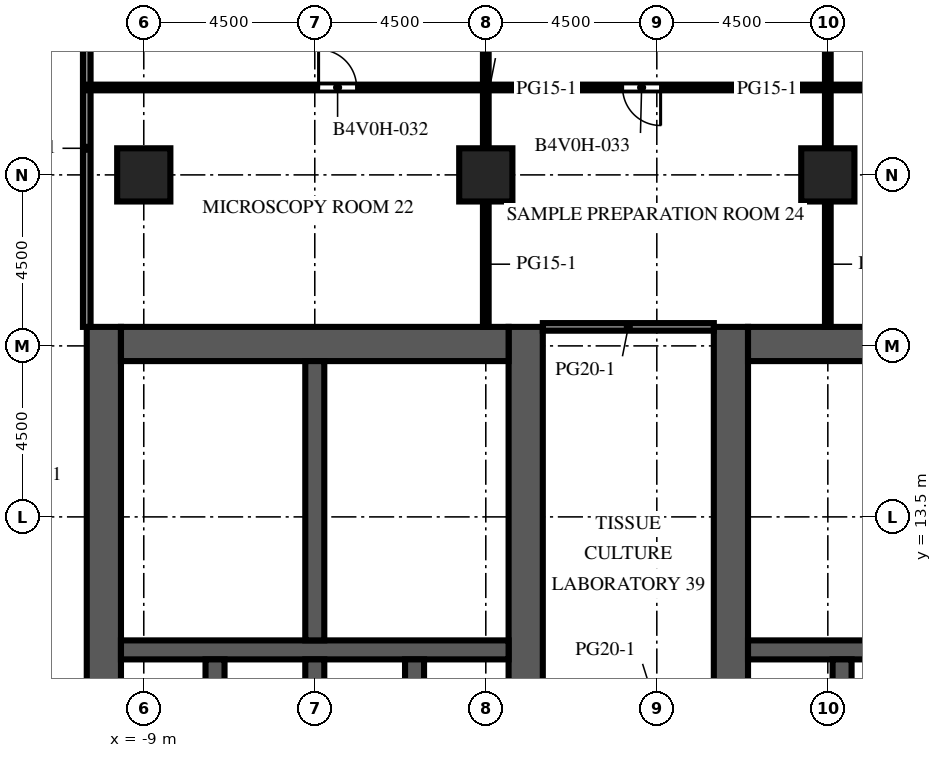
"""IFC4 building model, lengths in metres.
Left out: names, types, materials, properties, quantities, classifications, styles, units other than length and angle.
Written with IfcOpenShell. Run it as: python <this file> out.ifc"""

import sys

from ifc_helpers import new_model, si_unit, direction, frame, frame_2d, origin, origin_2d, place, context, subcontext, project, spatial, rectangle, extrude, element, fill, save


model = new_model("IFC4")
c1 = context("Model", 3, precision=1e-05, world=origin(), true_north=direction((0.0, 1.0)))
c2 = subcontext(c1, "Body", "Model", "MODEL_VIEW")
j1 = project(units=[si_unit("LENGTHUNIT", "METRE"), si_unit("PLANEANGLEUNIT", "RADIAN")], contexts=[c1])
p1 = place(None, origin())
s1 = spatial("IfcSite", under=j1, at=p1, CompositionType="ELEMENT")
p2 = place(p1, origin())
s2 = spatial("IfcBuilding", under=s1, at=p2, CompositionType="ELEMENT")
p3 = place(p2, frame((0.0, 0.0, 116.7)))
s3 = spatial("IfcBuildingStorey", under=s2, at=p3, CompositionType="ELEMENT", Elevation=116.7)
for number, where, z_axis, x_axis in (
    (1, (-9.0, 22.5, 0.0), (0.0, 0.0, 1.0), (1.0, 0.0, 0.0)),
    (2, (0.0, 22.5, 0.0), (0.0, 0.0, 1.0), (1.0, 0.0, 0.0)),
    (3, (9.0, 22.5, 0.0), (0.0, 0.0, 1.0), (1.0, 0.0, 0.0)),
):
    element("IfcColumn", number, at=place(p3, frame(where, z_axis=z_axis, x_axis=x_axis)), inside=s3, PredefinedType="COLUMN", context=c2, shape_type="SweptSolid", body=[
        extrude(rectangle(XDim=1.4, YDim=1.4, at=origin_2d()), origin(), (0.0, 0.0, 1.0), 4.1),
    ])
p4 = place(p3, frame((-10.05, -9.0, 0.0), z_axis=(0.0, 0.0, 1.0), x_axis=(0.0, 1.0, 0.0)))
e4 = element("IfcWall", 4, at=p4, inside=s3, PredefinedType="SHEAR", context=c2, shape_type="SweptSolid", body=[
    extrude(rectangle(XDim=27.5, YDim=0.9, at=frame_2d((13.75, 0.0))), origin(), (0.0, 0.0, 1.0), 4.1),
])
p5 = place(p4, frame((12.55, 0.0, 0.0)))
e5 = element("IfcOpeningElement", 5, at=p5, cuts=e4, PredefinedType="OPENING", context=c2, shape_type="SweptSolid", body=[
    extrude(rectangle(XDim=2.4, YDim=2.4, at=frame_2d((1.2, 1.2))), frame((0.0, 0.46, 0.0), z_axis=(0.0, -1.0, 0.0), x_axis=(1.0, 0.0, 0.0)), (0.0, 0.0, 1.0), 0.92),
])
p6 = place(p4, frame((6.825, 0.0, 0.0)))
e6 = element("IfcOpeningElement", 6, at=p6, cuts=e4, PredefinedType="OPENING", context=c2, shape_type="SweptSolid", body=[
    extrude(rectangle(XDim=1.2, YDim=2.1, at=frame_2d((0.6, 1.05))), frame((0.0, 0.46, 0.0), z_axis=(0.0, -1.0, 0.0), x_axis=(1.0, 0.0, 0.0)), (0.0, 0.0, 1.0), 0.92),
])
p7 = place(p4, frame((19.475, 0.0, 0.0)))
e7 = element("IfcOpeningElement", 7, at=p7, cuts=e4, PredefinedType="OPENING", context=c2, shape_type="SweptSolid", body=[
    extrude(rectangle(XDim=1.2, YDim=2.1, at=frame_2d((0.6, 1.05))), frame((0.0, 0.46, 0.0), z_axis=(0.0, -1.0, 0.0), x_axis=(1.0, 0.0, 0.0)), (0.0, 0.0, 1.0), 0.92),
])
p8 = place(p3, frame((1.05, -9.0, 0.0), z_axis=(0.0, 0.0, 1.0), x_axis=(0.0, 1.0, 0.0)))
e8 = element("IfcWall", 8, at=p8, inside=s3, PredefinedType="SHEAR", context=c2, shape_type="SweptSolid", body=[
    extrude(rectangle(XDim=27.5, YDim=0.9, at=frame_2d((13.75, 0.0))), origin(), (0.0, 0.0, 1.0), 4.1),
])
p9 = place(p8, frame((12.55, 0.0, 0.0)))
e9 = element("IfcOpeningElement", 9, at=p9, cuts=e8, PredefinedType="OPENING", context=c2, shape_type="SweptSolid", body=[
    extrude(rectangle(XDim=2.4, YDim=2.4, at=frame_2d((1.2, 1.2))), frame((0.0, 0.46, 0.0), z_axis=(0.0, -1.0, 0.0), x_axis=(1.0, 0.0, 0.0)), (0.0, 0.0, 1.0), 0.92),
])
p10 = place(p8, frame((3.975, 0.0, 0.0)))
e10 = element("IfcOpeningElement", 10, at=p10, cuts=e8, PredefinedType="OPENING", context=c2, shape_type="SweptSolid", body=[
    extrude(rectangle(XDim=1.2, YDim=2.1, at=frame_2d((0.6, 1.05))), frame((0.0, 0.46, 0.0), z_axis=(0.0, -1.0, 0.0), x_axis=(1.0, 0.0, 0.0)), (0.0, 0.0, 1.0), 0.92),
])
p11 = place(p8, frame((19.485, 0.0, 0.0)))
e11 = element("IfcOpeningElement", 11, at=p11, cuts=e8, PredefinedType="OPENING", context=c2, shape_type="SweptSolid", body=[
    extrude(rectangle(XDim=1.0, YDim=2.1, at=frame_2d((0.5, 1.05))), frame((0.0, 0.46, 0.0), z_axis=(0.0, -1.0, 0.0), x_axis=(1.0, 0.0, 0.0)), (0.0, 0.0, 1.0), 0.92),
])
p12 = place(p8, frame((21.139, 0.0, 0.0)))
e12 = element("IfcOpeningElement", 12, at=p12, cuts=e8, PredefinedType="OPENING", context=c2, shape_type="SweptSolid", body=[
    extrude(rectangle(XDim=1.0, YDim=2.1, at=frame_2d((0.5, 1.05))), frame((0.0, 0.46, 0.0), z_axis=(0.0, -1.0, 0.0), x_axis=(1.0, 0.0, 0.0)), (0.0, 0.0, 1.0), 0.92),
])
p13 = place(p8, frame((23.16, 0.0, 0.0)))
e13 = element("IfcOpeningElement", 13, at=p13, cuts=e8, PredefinedType="OPENING", context=c2, shape_type="SweptSolid", body=[
    extrude(rectangle(XDim=1.0, YDim=2.1, at=frame_2d((0.5, 1.05))), frame((0.0, 0.46, 0.0), z_axis=(0.0, -1.0, 0.0), x_axis=(1.0, 0.0, 0.0)), (0.0, 0.0, 1.0), 0.92),
])
p14 = place(p8, frame((25.181, 0.0, 0.0)))
e14 = element("IfcOpeningElement", 14, at=p14, cuts=e8, PredefinedType="OPENING", context=c2, shape_type="SweptSolid", body=[
    extrude(rectangle(XDim=1.0, YDim=2.1, at=frame_2d((0.5, 1.05))), frame((0.0, 0.46, 0.0), z_axis=(0.0, -1.0, 0.0), x_axis=(1.0, 0.0, 0.0)), (0.0, 0.0, 1.0), 0.92),
])
p15 = place(p3, frame((-9.6, 18.05, 0.0), z_axis=(0.0, 0.0, 1.0), x_axis=(1.0, 0.0, 0.0)))
e15 = element("IfcWall", 15, at=p15, inside=s3, PredefinedType="SHEAR", context=c2, shape_type="SweptSolid", body=[
    extrude(rectangle(XDim=10.2, YDim=0.9, at=frame_2d((5.1, 0.0))), origin(), (0.0, 0.0, 1.0), 4.1),
])
p16 = place(p3, frame((-9.6, 10.0, 0.0), z_axis=(0.0, 0.0, 1.0), x_axis=(1.0, 0.0, 0.0)))
e16 = element("IfcWall", 16, at=p16, inside=s3, PredefinedType="SHEAR", context=c2, shape_type="SweptSolid", body=[
    extrude(rectangle(XDim=10.2, YDim=0.5, at=frame_2d((5.1, 0.0))), origin(), (0.0, 0.0, 1.0), 4.1),
])
for number, where, z_axis, x_axis in (
    (17, (-7.125, 6.95, 0.0), (0.0, 0.0, 1.0), (0.0, 1.0, 0.0)),
    (18, (-4.5, 6.95, 0.0), (0.0, 0.0, 1.0), (0.0, 1.0, 0.0)),
    (19, (-1.875, 6.95, 0.0), (0.0, 0.0, 1.0), (0.0, 1.0, 0.0)),
):
    element("IfcWall", number, at=place(p3, frame(where, z_axis=z_axis, x_axis=x_axis)), inside=s3, PredefinedType="SHEAR", context=c2, shape_type="SweptSolid", body=[
        extrude(rectangle(XDim=2.8, YDim=0.5, at=frame_2d((1.4, 0.0))), origin(), (0.0, 0.0, 1.0), 4.1),
    ])
p17 = place(p3, frame((-4.5, 10.25, 0.0), z_axis=(0.0, 0.0, 1.0), x_axis=(0.0, 1.0, 0.0)))
e20 = element("IfcWall", 20, at=p17, inside=s3, PredefinedType="SHEAR", context=c2, shape_type="SweptSolid", body=[
    extrude(rectangle(XDim=7.35, YDim=0.5, at=frame_2d((3.675, 0.0))), origin(), (0.0, 0.0, 1.0), 4.1),
])
p18 = place(p3, frame((6.45, -9.0, 0.0), z_axis=(0.0, 0.0, 1.0), x_axis=(0.0, 1.0, 0.0)))
e21 = element("IfcWall", 21, at=p18, inside=s3, PredefinedType="SHEAR", context=c2, shape_type="SweptSolid", body=[
    extrude(rectangle(XDim=27.5, YDim=0.9, at=frame_2d((13.75, 0.0))), origin(), (0.0, 0.0, 1.0), 4.1),
])
p19 = place(p18, frame((12.55, 0.0, 0.0)))
e22 = element("IfcOpeningElement", 22, at=p19, cuts=e21, PredefinedType="OPENING", context=c2, shape_type="SweptSolid", body=[
    extrude(rectangle(XDim=2.4, YDim=2.4, at=frame_2d((1.2, 1.2))), frame((0.0, 0.46, 0.0), z_axis=(0.0, -1.0, 0.0), x_axis=(1.0, 0.0, 0.0)), (0.0, 0.0, 1.0), 0.92),
])
p20 = place(p18, frame((3.975, 0.0, 0.0)))
e23 = element("IfcOpeningElement", 23, at=p20, cuts=e21, PredefinedType="OPENING", context=c2, shape_type="SweptSolid", body=[
    extrude(rectangle(XDim=1.2, YDim=2.1, at=frame_2d((0.6, 1.05))), frame((0.0, 0.46, 0.0), z_axis=(0.0, -1.0, 0.0), x_axis=(1.0, 0.0, 0.0)), (0.0, 0.0, 1.0), 0.92),
])
p21 = place(p18, frame((19.485, 0.0, 0.0)))
e24 = element("IfcOpeningElement", 24, at=p21, cuts=e21, PredefinedType="OPENING", context=c2, shape_type="SweptSolid", body=[
    extrude(rectangle(XDim=1.0, YDim=2.1, at=frame_2d((0.5, 1.05))), frame((0.0, 0.46, 0.0), z_axis=(0.0, -1.0, 0.0), x_axis=(1.0, 0.0, 0.0)), (0.0, 0.0, 1.0), 0.92),
])
p22 = place(p18, frame((21.139, 0.0, 0.0)))
e25 = element("IfcOpeningElement", 25, at=p22, cuts=e21, PredefinedType="OPENING", context=c2, shape_type="SweptSolid", body=[
    extrude(rectangle(XDim=1.0, YDim=2.1, at=frame_2d((0.5, 1.05))), frame((0.0, 0.46, 0.0), z_axis=(0.0, -1.0, 0.0), x_axis=(1.0, 0.0, 0.0)), (0.0, 0.0, 1.0), 0.92),
])
p23 = place(p18, frame((23.16, 0.0, 0.0)))
e26 = element("IfcOpeningElement", 26, at=p23, cuts=e21, PredefinedType="OPENING", context=c2, shape_type="SweptSolid", body=[
    extrude(rectangle(XDim=1.0, YDim=2.1, at=frame_2d((0.5, 1.05))), frame((0.0, 0.46, 0.0), z_axis=(0.0, -1.0, 0.0), x_axis=(1.0, 0.0, 0.0)), (0.0, 0.0, 1.0), 0.92),
])
p24 = place(p18, frame((25.181, 0.0, 0.0)))
e27 = element("IfcOpeningElement", 27, at=p24, cuts=e21, PredefinedType="OPENING", context=c2, shape_type="SweptSolid", body=[
    extrude(rectangle(XDim=1.0, YDim=2.1, at=frame_2d((0.5, 1.05))), frame((0.0, 0.46, 0.0), z_axis=(0.0, -1.0, 0.0), x_axis=(1.0, 0.0, 0.0)), (0.0, 0.0, 1.0), 0.92),
])
p25 = place(p3, frame((6.9, 18.05, 0.0), z_axis=(0.0, 0.0, 1.0), x_axis=(1.0, 0.0, 0.0)))
e28 = element("IfcWall", 28, at=p25, inside=s3, PredefinedType="SHEAR", context=c2, shape_type="SweptSolid", body=[
    extrude(rectangle(XDim=10.2, YDim=0.9, at=frame_2d((5.1, 0.0))), origin(), (0.0, 0.0, 1.0), 4.1),
])
p26 = place(p3, frame((6.9, 10.0, 0.0), z_axis=(0.0, 0.0, 1.0), x_axis=(1.0, 0.0, 0.0)))
e29 = element("IfcWall", 29, at=p26, inside=s3, PredefinedType="SHEAR", context=c2, shape_type="SweptSolid", body=[
    extrude(rectangle(XDim=10.2, YDim=0.5, at=frame_2d((5.1, 0.0))), origin(), (0.0, 0.0, 1.0), 4.1),
])
p27 = place(p3, frame((9.375, 6.95, 0.0), z_axis=(0.0, 0.0, 1.0), x_axis=(0.0, 1.0, 0.0)))
e30 = element("IfcWall", 30, at=p27, inside=s3, PredefinedType="SHEAR", context=c2, shape_type="SweptSolid", body=[
    extrude(rectangle(XDim=2.8, YDim=0.5, at=frame_2d((1.4, 0.0))), origin(), (0.0, 0.0, 1.0), 4.1),
])
for number, where, z_axis, x_axis in (
    (31, (-4.25, 11.72, 0.0), (0.0, 0.0, 1.0), (1.0, 0.0, 0.0)),
    (32, (-4.25, 13.558, 0.0), (0.0, 0.0, 1.0), (1.0, 0.0, 0.0)),
    (33, (-4.25, 15.762, 0.0), (0.0, 0.0, 1.0), (1.0, 0.0, 0.0)),
    (34, (6.9, 11.72, 0.0), (0.0, 0.0, 1.0), (1.0, 0.0, 0.0)),
    (35, (6.9, 13.558, 0.0), (0.0, 0.0, 1.0), (1.0, 0.0, 0.0)),
    (36, (6.9, 15.762, 0.0), (0.0, 0.0, 1.0), (1.0, 0.0, 0.0)),
):
    element("IfcWall", number, at=place(p3, frame(where, z_axis=z_axis, x_axis=x_axis)), inside=s3, PredefinedType="PARTITIONING", context=c2, shape_type="SweptSolid", body=[
        extrude(rectangle(XDim=4.85, YDim=0.1, at=frame_2d((2.425, 0.0))), origin(), (0.0, 0.0, 1.0), 3.65),
    ])
p28 = place(p3, frame((-10.5, 31.35, 0.0), z_axis=(0.0, 0.0, 1.0), x_axis=(0.0, -1.0, 0.0)))
e37 = element("IfcWall", 37, at=p28, inside=s3, PredefinedType="PARTITIONING", context=c2, shape_type="SweptSolid", body=[
    extrude(rectangle(XDim=12.85, YDim=0.2, at=frame_2d((6.425, 0.0))), origin(), (0.0, 0.0, 1.0), 3.65),
])
p29 = place(p28, frame((2.45, 0.0, 0.0)))
e38 = element("IfcOpeningElement", 38, at=p29, cuts=e37, PredefinedType="OPENING", context=c2, shape_type="SweptSolid", body=[
    extrude(rectangle(XDim=1.0, YDim=2.1, at=frame_2d((0.5, 1.05))), frame((0.0, 0.11, 0.0), z_axis=(0.0, -1.0, 0.0), x_axis=(1.0, 0.0, 0.0)), (0.0, 0.0, 1.0), 0.22),
])
p30 = place(p3, frame((0.0, 18.5, 0.0), z_axis=(0.0, 0.0, 1.0), x_axis=(0.0, 1.0, 0.0)))
e39 = element("IfcWall", 39, at=p30, inside=s3, PredefinedType="PARTITIONING", context=c2, shape_type="SweptSolid", body=[
    extrude(rectangle(XDim=3.3, YDim=0.15, at=frame_2d((1.65, 0.0))), origin(), (0.0, 0.0, 1.0), 3.65),
])
p31 = place(p3, frame((0.0, 23.2, 0.0), z_axis=(0.0, 0.0, 1.0), x_axis=(0.0, 1.0, 0.0)))
e40 = element("IfcWall", 40, at=p31, inside=s3, PredefinedType="PARTITIONING", context=c2, shape_type="SweptSolid", body=[
    extrude(rectangle(XDim=3.1, YDim=0.15, at=frame_2d((1.55, 0.0))), origin(), (0.0, 0.0, 1.0), 3.65),
])
p32 = place(p3, frame((9.0, 18.5, 0.0), z_axis=(0.0, 0.0, 1.0), x_axis=(0.0, 1.0, 0.0)))
e41 = element("IfcWall", 41, at=p32, inside=s3, PredefinedType="PARTITIONING", context=c2, shape_type="SweptSolid", body=[
    extrude(rectangle(XDim=3.3, YDim=0.15, at=frame_2d((1.65, 0.0))), origin(), (0.0, 0.0, 1.0), 3.65),
])
p33 = place(p3, frame((9.0, 23.2, 0.0), z_axis=(0.0, 0.0, 1.0), x_axis=(0.0, 1.0, 0.0)))
e42 = element("IfcWall", 42, at=p33, inside=s3, PredefinedType="PARTITIONING", context=c2, shape_type="SweptSolid", body=[
    extrude(rectangle(XDim=3.1, YDim=0.15, at=frame_2d((1.55, 0.0))), origin(), (0.0, 0.0, 1.0), 3.65),
])
p34 = place(p3, frame((1.5, 18.5, 0.0), z_axis=(0.0, 0.0, 1.0), x_axis=(1.0, 0.0, 0.0)))
e43 = element("IfcWall", 43, at=p34, inside=s3, PredefinedType="PARTITIONING", context=c2, shape_type="SweptSolid", body=[
    extrude(rectangle(XDim=4.5, YDim=0.2, at=frame_2d((2.25, 0.0))), origin(), (0.0, 0.0, 1.0), 3.65),
])
p35 = place(p3, frame((18.0, 24.8, 0.0), z_axis=(0.0, 0.0, 1.0), x_axis=(-1.0, 0.0, 0.0)))
e44 = element("IfcWall", 44, at=p35, inside=s3, PredefinedType="PARTITIONING", context=c2, shape_type="SweptSolid", body=[
    extrude(rectangle(XDim=28.5, YDim=0.15, at=frame_2d((14.25, 0.0))), origin(), (0.0, 0.0, 1.0), 3.65),
])
p36 = place(p35, frame((21.4, 0.0, 0.0)))
e45 = element("IfcOpeningElement", 45, at=p36, cuts=e44, PredefinedType="OPENING", context=c2, shape_type="SweptSolid", body=[
    extrude(rectangle(XDim=1.0, YDim=2.1, at=frame_2d((0.5, 1.05))), frame((0.0, 0.085, 0.0), z_axis=(0.0, -1.0, 0.0), x_axis=(1.0, 0.0, 0.0)), (0.0, 0.0, 1.0), 0.17),
])
p37 = place(p35, frame((13.4, 0.0, 0.0)))
e46 = element("IfcOpeningElement", 46, at=p37, cuts=e44, PredefinedType="OPENING", context=c2, shape_type="SweptSolid", body=[
    extrude(rectangle(XDim=1.0, YDim=2.1, at=frame_2d((0.5, 1.05))), frame((0.0, 0.085, 0.0), z_axis=(0.0, -1.0, 0.0), x_axis=(1.0, 0.0, 0.0)), (0.0, 0.0, 1.0), 0.17),
])
p38 = place(p35, frame((6.15, 0.0, 0.0)))
e47 = element("IfcOpeningElement", 47, at=p38, cuts=e44, PredefinedType="OPENING", context=c2, shape_type="SweptSolid", body=[
    extrude(rectangle(XDim=1.0, YDim=2.1, at=frame_2d((0.5, 1.05))), frame((0.0, 0.085, 0.0), z_axis=(0.0, -1.0, 0.0), x_axis=(1.0, 0.0, 0.0)), (0.0, 0.0, 1.0), 0.17),
])
p39 = place(p35, frame((2.15, 0.0, 0.0)))
e48 = element("IfcOpeningElement", 48, at=p39, cuts=e44, PredefinedType="OPENING", context=c2, shape_type="SweptSolid", body=[
    extrude(rectangle(XDim=1.0, YDim=2.1, at=frame_2d((0.5, 1.05))), frame((0.0, 0.085, 0.0), z_axis=(0.0, -1.0, 0.0), x_axis=(1.0, 0.0, 0.0)), (0.0, 0.0, 1.0), 0.17),
])
p40 = place(p7, origin())
e49 = element("IfcDoor", 49, at=p40, inside=s3, OperationType="SINGLE_SWING_LEFT", PredefinedType="DOOR", context=c2, shape_type="SweptSolid", body=[
    extrude(rectangle(XDim=1.2, YDim=2.1, at=frame_2d((0.6, 1.05))), frame((0.0, 0.025, 0.0), z_axis=(0.0, -1.0, 0.0), x_axis=(1.0, 0.0, 0.0)), (0.0, 0.0, 1.0), 0.05),
])
fill(e7, e49)
p41 = place(p11, origin())
e50 = element("IfcDoor", 50, at=p41, inside=s3, OperationType="SINGLE_SWING_LEFT", PredefinedType="DOOR", context=c2, shape_type="SweptSolid", body=[
    extrude(rectangle(XDim=1.0, YDim=2.1, at=frame_2d((0.5, 1.05))), frame((0.0, 0.425, 0.0), z_axis=(0.0, -1.0, 0.0), x_axis=(1.0, 0.0, 0.0)), (0.0, 0.0, 1.0), 0.05),
])
fill(e11, e50)
p42 = place(p12, origin())
e51 = element("IfcDoor", 51, at=p42, inside=s3, OperationType="SINGLE_SWING_RIGHT", PredefinedType="DOOR", context=c2, shape_type="SweptSolid", body=[
    extrude(rectangle(XDim=1.0, YDim=2.1, at=frame_2d((0.5, 1.05))), frame((0.0, 0.425, 0.0), z_axis=(0.0, -1.0, 0.0), x_axis=(1.0, 0.0, 0.0)), (0.0, 0.0, 1.0), 0.05),
])
fill(e12, e51)
p43 = place(p13, origin())
e52 = element("IfcDoor", 52, at=p43, inside=s3, OperationType="SINGLE_SWING_LEFT", PredefinedType="DOOR", context=c2, shape_type="SweptSolid", body=[
    extrude(rectangle(XDim=1.0, YDim=2.1, at=frame_2d((0.5, 1.05))), frame((0.0, 0.425, 0.0), z_axis=(0.0, -1.0, 0.0), x_axis=(1.0, 0.0, 0.0)), (0.0, 0.0, 1.0), 0.05),
])
fill(e13, e52)
p44 = place(p14, origin())
e53 = element("IfcDoor", 53, at=p44, inside=s3, OperationType="SINGLE_SWING_RIGHT", PredefinedType="DOOR", context=c2, shape_type="SweptSolid", body=[
    extrude(rectangle(XDim=1.0, YDim=2.1, at=frame_2d((0.5, 1.05))), frame((0.0, 0.425, 0.0), z_axis=(0.0, -1.0, 0.0), x_axis=(1.0, 0.0, 0.0)), (0.0, 0.0, 1.0), 0.05),
])
fill(e14, e53)
p45 = place(p21, origin())
e54 = element("IfcDoor", 54, at=p45, inside=s3, OperationType="SINGLE_SWING_RIGHT", PredefinedType="DOOR", context=c2, shape_type="SweptSolid", body=[
    extrude(rectangle(XDim=1.0, YDim=2.1, at=frame_2d((0.5, 1.05))), frame((0.0, -0.375, 0.0), z_axis=(0.0, -1.0, 0.0), x_axis=(1.0, 0.0, 0.0)), (0.0, 0.0, 1.0), 0.05),
])
fill(e24, e54)
p46 = place(p22, origin())
e55 = element("IfcDoor", 55, at=p46, inside=s3, OperationType="SINGLE_SWING_LEFT", PredefinedType="DOOR", context=c2, shape_type="SweptSolid", body=[
    extrude(rectangle(XDim=1.0, YDim=2.1, at=frame_2d((0.5, 1.05))), frame((0.0, -0.375, 0.0), z_axis=(0.0, -1.0, 0.0), x_axis=(1.0, 0.0, 0.0)), (0.0, 0.0, 1.0), 0.05),
])
fill(e25, e55)
p47 = place(p23, origin())
e56 = element("IfcDoor", 56, at=p47, inside=s3, OperationType="SINGLE_SWING_RIGHT", PredefinedType="DOOR", context=c2, shape_type="SweptSolid", body=[
    extrude(rectangle(XDim=1.0, YDim=2.1, at=frame_2d((0.5, 1.05))), frame((0.0, -0.375, 0.0), z_axis=(0.0, -1.0, 0.0), x_axis=(1.0, 0.0, 0.0)), (0.0, 0.0, 1.0), 0.05),
])
fill(e26, e56)
p48 = place(p24, origin())
e57 = element("IfcDoor", 57, at=p48, inside=s3, OperationType="SINGLE_SWING_LEFT", PredefinedType="DOOR", context=c2, shape_type="SweptSolid", body=[
    extrude(rectangle(XDim=1.0, YDim=2.1, at=frame_2d((0.5, 1.05))), frame((0.0, -0.375, 0.0), z_axis=(0.0, -1.0, 0.0), x_axis=(1.0, 0.0, 0.0)), (0.0, 0.0, 1.0), 0.05),
])
fill(e27, e57)
p49 = place(p36, origin())
e58 = element("IfcDoor", 58, at=p49, inside=s3, OperationType="SINGLE_SWING_RIGHT", PredefinedType="DOOR", context=c2, shape_type="SweptSolid", body=[
    extrude(rectangle(XDim=1.0, YDim=2.1, at=frame_2d((0.5, 1.05))), frame((0.0, 0.025, 0.0), z_axis=(0.0, -1.0, 0.0), x_axis=(1.0, 0.0, 0.0)), (0.0, 0.0, 1.0), 0.05),
])
fill(e45, e58)
p50 = place(p37, origin())
e59 = element("IfcDoor", 59, at=p50, inside=s3, OperationType="SINGLE_SWING_LEFT", PredefinedType="DOOR", context=c2, shape_type="SweptSolid", body=[
    extrude(rectangle(XDim=1.0, YDim=2.1, at=frame_2d((0.5, 1.05))), frame((0.0, 0.025, 0.0), z_axis=(0.0, -1.0, 0.0), x_axis=(1.0, 0.0, 0.0)), (0.0, 0.0, 1.0), 0.05),
])
fill(e46, e59)
save(model, sys.argv[1])
